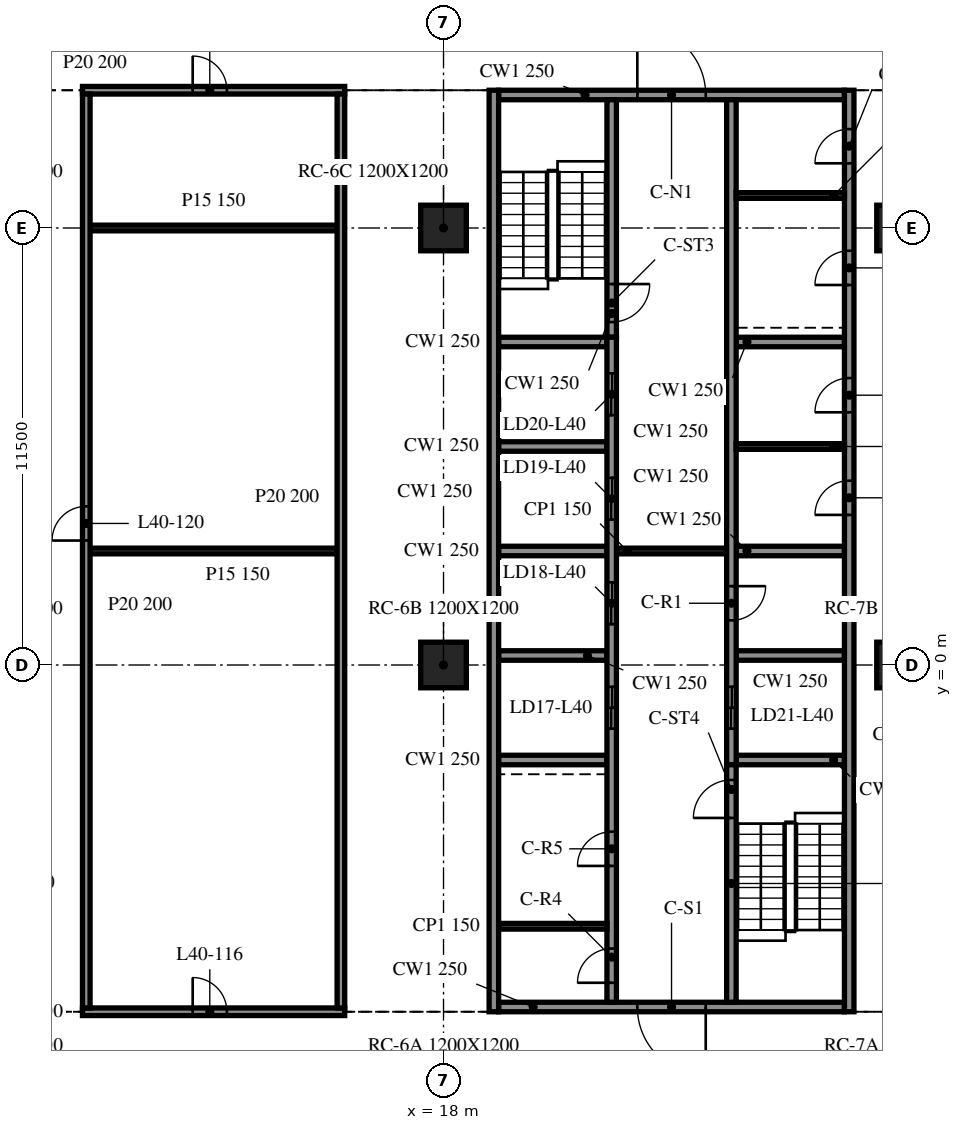
"""IFC4 building model, lengths in metres.
Left out: names, types, materials, properties, quantities, classifications, styles, units other than length and angle.
Written with IfcOpenShell. Run it as: python <this file> out.ifc"""

import sys

from ifc_helpers import new_model, si_unit, direction, frame, frame_2d, origin, origin_2d, place, context, subcontext, project, spatial, rectangle, extrude, element, fill, save


model = new_model("IFC4")
c1 = context("Model", 3, precision=1e-05, world=origin(), true_north=direction((0.0, 1.0)))
c2 = subcontext(c1, "Body", "Model", "MODEL_VIEW")
j1 = project(units=[si_unit("LENGTHUNIT", "METRE"), si_unit("PLANEANGLEUNIT", "RADIAN")], contexts=[c1])
p1 = place(None, origin())
s1 = spatial("IfcSite", under=j1, at=p1, CompositionType="ELEMENT")
p2 = place(p1, origin())
s2 = spatial("IfcBuilding", under=s1, at=p2, CompositionType="ELEMENT")
p3 = place(p2, frame((0.0, 0.0, 170.6)))
s3 = spatial("IfcBuildingStorey", under=s2, at=p3, CompositionType="ELEMENT", Elevation=170.6)
for number, where, z_axis, x_axis in (
    (1, (18.0, 0.0, -0.34), (0.0, 0.0, 1.0), (1.0, 0.0, 0.0)),
    (2, (18.0, 11.5, -0.34), (0.0, 0.0, 1.0), (1.0, 0.0, 0.0)),
    (3, (30.0, 0.0, -0.34), (0.0, 0.0, 1.0), (1.0, 0.0, 0.0)),
    (4, (30.0, 11.5, -0.34), (0.0, 0.0, 1.0), (1.0, 0.0, 0.0)),
):
    element("IfcColumn", number, at=place(p3, frame(where, z_axis=z_axis, x_axis=x_axis)), inside=s3, PredefinedType="COLUMN", context=c2, shape_type="SweptSolid", body=[
        extrude(rectangle(XDim=1.2, YDim=1.2, at=origin_2d()), origin(), (0.0, 0.0, 1.0), 3.8),
    ])
p4 = place(p3, frame((19.325, 15.125, 0.0), z_axis=(0.0, 0.0, 1.0), x_axis=(0.0, -1.0, 0.0)))
e5 = element("IfcWall", 5, at=p4, inside=s3, PredefinedType="SOLIDWALL", context=c2, shape_type="SweptSolid", body=[
    extrude(rectangle(XDim=24.25, YDim=0.25, at=frame_2d((12.125, 0.0))), origin(), (0.0, 0.0, 1.0), 3.46),
])
p5 = place(p3, frame((28.675, -9.125, 0.0), z_axis=(0.0, 0.0, 1.0), x_axis=(0.0, 1.0, 0.0)))
e6 = element("IfcWall", 6, at=p5, inside=s3, PredefinedType="SOLIDWALL", context=c2, shape_type="SweptSolid", body=[
    extrude(rectangle(XDim=24.25, YDim=0.25, at=frame_2d((12.125, 0.0))), origin(), (0.0, 0.0, 1.0), 3.46),
])
p6 = place(p5, frame((13.075, 0.0, 0.0)))
e7 = element("IfcOpeningElement", 7, at=p6, cuts=e6, PredefinedType="OPENING", context=c2, shape_type="SweptSolid", body=[
    extrude(rectangle(XDim=0.9, YDim=2.1, at=frame_2d((0.45, 1.05))), frame((0.0, 0.135, 0.0), z_axis=(0.0, -1.0, 0.0), x_axis=(1.0, 0.0, 0.0)), (0.0, 0.0, 1.0), 0.27),
])
p7 = place(p5, frame((15.775, 0.0, 0.0)))
e8 = element("IfcOpeningElement", 8, at=p7, cuts=e6, PredefinedType="OPENING", context=c2, shape_type="SweptSolid", body=[
    extrude(rectangle(XDim=0.9, YDim=2.1, at=frame_2d((0.45, 1.05))), frame((0.0, 0.135, 0.0), z_axis=(0.0, -1.0, 0.0), x_axis=(1.0, 0.0, 0.0)), (0.0, 0.0, 1.0), 0.27),
])
p8 = place(p5, frame((19.125, 0.0, 0.0)))
e9 = element("IfcOpeningElement", 9, at=p8, cuts=e6, PredefinedType="OPENING", context=c2, shape_type="SweptSolid", body=[
    extrude(rectangle(XDim=0.9, YDim=2.1, at=frame_2d((0.45, 1.05))), frame((0.0, 0.135, 0.0), z_axis=(0.0, -1.0, 0.0), x_axis=(1.0, 0.0, 0.0)), (0.0, 0.0, 1.0), 0.27),
])
p9 = place(p5, frame((22.327, 0.0, 0.0)))
e10 = element("IfcOpeningElement", 10, at=p9, cuts=e6, PredefinedType="OPENING", context=c2, shape_type="SweptSolid", body=[
    extrude(rectangle(XDim=0.9, YDim=2.1, at=frame_2d((0.45, 1.05))), frame((0.0, 0.135, 0.0), z_axis=(0.0, -1.0, 0.0), x_axis=(1.0, 0.0, 0.0)), (0.0, 0.0, 1.0), 0.27),
])
p10 = place(p3, frame((28.55, -9.0, 0.0), z_axis=(0.0, 0.0, 1.0), x_axis=(-1.0, 0.0, 0.0)))
e11 = element("IfcWall", 11, at=p10, inside=s3, PredefinedType="SOLIDWALL", context=c2, shape_type="SweptSolid", body=[
    extrude(rectangle(XDim=9.1, YDim=0.25, at=frame_2d((4.55, 0.0))), origin(), (0.0, 0.0, 1.0), 3.46),
])
p11 = place(p10, frame((3.65, 0.0, 0.0)))
e12 = element("IfcOpeningElement", 12, at=p11, cuts=e11, PredefinedType="OPENING", context=c2, shape_type="SweptSolid", body=[
    extrude(rectangle(XDim=1.8, YDim=2.1, at=frame_2d((0.9, 1.05))), frame((0.0, 0.135, 0.0), z_axis=(0.0, -1.0, 0.0), x_axis=(1.0, 0.0, 0.0)), (0.0, 0.0, 1.0), 0.27),
])
p12 = place(p3, frame((19.45, 15.0, 0.0), z_axis=(0.0, 0.0, 1.0), x_axis=(1.0, 0.0, 0.0)))
e13 = element("IfcWall", 13, at=p12, inside=s3, PredefinedType="SOLIDWALL", context=c2, shape_type="SweptSolid", body=[
    extrude(rectangle(XDim=9.1, YDim=0.25, at=frame_2d((4.55, 0.0))), origin(), (0.0, 0.0, 1.0), 3.46),
])
p13 = place(p12, frame((3.65, 0.0, 0.0)))
e14 = element("IfcOpeningElement", 14, at=p13, cuts=e13, PredefinedType="OPENING", context=c2, shape_type="SweptSolid", body=[
    extrude(rectangle(XDim=1.8, YDim=2.1, at=frame_2d((0.9, 1.05))), frame((0.0, 0.135, 0.0), z_axis=(0.0, -1.0, 0.0), x_axis=(1.0, 0.0, 0.0)), (0.0, 0.0, 1.0), 0.27),
])
p14 = place(p3, frame((22.425, -8.875, 0.0), z_axis=(0.0, 0.0, 1.0), x_axis=(0.0, 1.0, 0.0)))
e15 = element("IfcWall", 15, at=p14, inside=s3, PredefinedType="SOLIDWALL", context=c2, shape_type="SweptSolid", body=[
    extrude(rectangle(XDim=17.5, YDim=0.25, at=frame_2d((8.75, 0.0))), origin(), (0.0, 0.0, 1.0), 3.46),
])
p15 = place(p14, frame((7.2, 0.0, 0.0)))
e16 = element("IfcOpeningElement", 16, at=p15, cuts=e15, PredefinedType="OPENING", context=c2, shape_type="SweptSolid", body=[
    extrude(rectangle(XDim=1.1, YDim=2.1, at=frame_2d((0.55, 1.05))), frame((0.0, 0.135, 0.0), z_axis=(0.0, -1.0, 0.0), x_axis=(1.0, 0.0, 0.0)), (0.0, 0.0, 1.0), 0.27),
])
p16 = place(p14, frame((9.95, 0.0, 0.0)))
e17 = element("IfcOpeningElement", 17, at=p16, cuts=e15, PredefinedType="OPENING", context=c2, shape_type="SweptSolid", body=[
    extrude(rectangle(XDim=1.1, YDim=2.1, at=frame_2d((0.55, 1.05))), frame((0.0, 0.135, 0.0), z_axis=(0.0, -1.0, 0.0), x_axis=(1.0, 0.0, 0.0)), (0.0, 0.0, 1.0), 0.27),
])
p17 = place(p14, frame((12.7, 0.0, 0.0)))
e18 = element("IfcOpeningElement", 18, at=p17, cuts=e15, PredefinedType="OPENING", context=c2, shape_type="SweptSolid", body=[
    extrude(rectangle(XDim=1.1, YDim=2.1, at=frame_2d((0.55, 1.05))), frame((0.0, 0.135, 0.0), z_axis=(0.0, -1.0, 0.0), x_axis=(1.0, 0.0, 0.0)), (0.0, 0.0, 1.0), 0.27),
])
p18 = place(p14, frame((15.45, 0.0, 0.0)))
e19 = element("IfcOpeningElement", 19, at=p18, cuts=e15, PredefinedType="OPENING", context=c2, shape_type="SweptSolid", body=[
    extrude(rectangle(XDim=1.1, YDim=2.1, at=frame_2d((0.55, 1.05))), frame((0.0, 0.135, 0.0), z_axis=(0.0, -1.0, 0.0), x_axis=(1.0, 0.0, 0.0)), (0.0, 0.0, 1.0), 0.27),
])
p19 = place(p14, frame((0.512, 0.0, 0.0)))
e20 = element("IfcOpeningElement", 20, at=p19, cuts=e15, PredefinedType="OPENING", context=c2, shape_type="SweptSolid", body=[
    extrude(rectangle(XDim=0.9, YDim=2.1, at=frame_2d((0.45, 1.05))), frame((0.0, 0.135, 0.0), z_axis=(0.0, -1.0, 0.0), x_axis=(1.0, 0.0, 0.0)), (0.0, 0.0, 1.0), 0.27),
])
p20 = place(p14, frame((3.587, 0.0, 0.0)))
e21 = element("IfcOpeningElement", 21, at=p20, cuts=e15, PredefinedType="OPENING", context=c2, shape_type="SweptSolid", body=[
    extrude(rectangle(XDim=0.9, YDim=2.1, at=frame_2d((0.45, 1.05))), frame((0.0, 0.135, 0.0), z_axis=(0.0, -1.0, 0.0), x_axis=(1.0, 0.0, 0.0)), (0.0, 0.0, 1.0), 0.27),
])
p21 = place(p3, frame((22.425, 14.875, 0.0), z_axis=(0.0, 0.0, 1.0), x_axis=(0.0, -1.0, 0.0)))
e22 = element("IfcWall", 22, at=p21, inside=s3, PredefinedType="SOLIDWALL", context=c2, shape_type="SweptSolid", body=[
    extrude(rectangle(XDim=6.25, YDim=0.25, at=frame_2d((3.125, 0.0))), origin(), (0.0, 0.0, 1.0), 3.46),
])
p22 = place(p21, frame((4.85, 0.0, 0.0)))
e23 = element("IfcOpeningElement", 23, at=p22, cuts=e22, PredefinedType="OPENING", context=c2, shape_type="SweptSolid", body=[
    extrude(rectangle(XDim=1.0, YDim=2.1, at=frame_2d((0.5, 1.05))), frame((0.0, 0.135, 0.0), z_axis=(0.0, -1.0, 0.0), x_axis=(1.0, 0.0, 0.0)), (0.0, 0.0, 1.0), 0.27),
])
p23 = place(p3, frame((25.575, -8.875, 0.0), z_axis=(0.0, 0.0, 1.0), x_axis=(0.0, 1.0, 0.0)))
e24 = element("IfcWall", 24, at=p23, inside=s3, PredefinedType="SOLIDWALL", context=c2, shape_type="SweptSolid", body=[
    extrude(rectangle(XDim=6.25, YDim=0.25, at=frame_2d((3.125, 0.0))), origin(), (0.0, 0.0, 1.0), 3.46),
])
p24 = place(p23, frame((4.85, 0.0, 0.0)))
e25 = element("IfcOpeningElement", 25, at=p24, cuts=e24, PredefinedType="OPENING", context=c2, shape_type="SweptSolid", body=[
    extrude(rectangle(XDim=1.0, YDim=2.1, at=frame_2d((0.5, 1.05))), frame((0.0, 0.135, 0.0), z_axis=(0.0, -1.0, 0.0), x_axis=(1.0, 0.0, 0.0)), (0.0, 0.0, 1.0), 0.27),
])
p25 = place(p3, frame((25.575, 14.875, 0.0), z_axis=(0.0, 0.0, 1.0), x_axis=(0.0, -1.0, 0.0)))
e26 = element("IfcWall", 26, at=p25, inside=s3, PredefinedType="SOLIDWALL", context=c2, shape_type="SweptSolid", body=[
    extrude(rectangle(XDim=17.5, YDim=0.25, at=frame_2d((8.75, 0.0))), origin(), (0.0, 0.0, 1.0), 3.46),
])
p26 = place(p25, frame((15.45, 0.0, 0.0)))
e27 = element("IfcOpeningElement", 27, at=p26, cuts=e26, PredefinedType="OPENING", context=c2, shape_type="SweptSolid", body=[
    extrude(rectangle(XDim=1.1, YDim=2.1, at=frame_2d((0.55, 1.05))), frame((0.0, 0.135, 0.0), z_axis=(0.0, -1.0, 0.0), x_axis=(1.0, 0.0, 0.0)), (0.0, 0.0, 1.0), 0.27),
])
p27 = place(p25, frame((12.8, 0.0, 0.0)))
e28 = element("IfcOpeningElement", 28, at=p27, cuts=e26, PredefinedType="OPENING", context=c2, shape_type="SweptSolid", body=[
    extrude(rectangle(XDim=0.9, YDim=2.1, at=frame_2d((0.45, 1.05))), frame((0.0, 0.135, 0.0), z_axis=(0.0, -1.0, 0.0), x_axis=(1.0, 0.0, 0.0)), (0.0, 0.0, 1.0), 0.27),
])
for number, where, z_axis, x_axis in (
    (29, (19.45, -2.5, 0.0), (0.0, 0.0, 1.0), (1.0, 0.0, 0.0)),
    (30, (19.45, 0.25, 0.0), (0.0, 0.0, 1.0), (1.0, 0.0, 0.0)),
    (31, (19.45, 3.0, 0.0), (0.0, 0.0, 1.0), (1.0, 0.0, 0.0)),
    (32, (19.45, 5.75, 0.0), (0.0, 0.0, 1.0), (1.0, 0.0, 0.0)),
    (33, (19.45, 8.5, 0.0), (0.0, 0.0, 1.0), (1.0, 0.0, 0.0)),
    (34, (25.7, -2.5, 0.0), (0.0, 0.0, 1.0), (1.0, 0.0, 0.0)),
    (35, (25.7, 0.25, 0.0), (0.0, 0.0, 1.0), (1.0, 0.0, 0.0)),
    (36, (25.7, 3.0, 0.0), (0.0, 0.0, 1.0), (1.0, 0.0, 0.0)),
    (37, (25.7, 8.5, 0.0), (0.0, 0.0, 1.0), (1.0, 0.0, 0.0)),
):
    element("IfcWall", number, at=place(p3, frame(where, z_axis=z_axis, x_axis=x_axis)), inside=s3, PredefinedType="SOLIDWALL", context=c2, shape_type="SweptSolid", body=[
        extrude(rectangle(XDim=2.85, YDim=0.25, at=frame_2d((1.425, 0.0))), origin(), (0.0, 0.0, 1.0), 3.46),
    ])
p28 = place(p3, frame((22.55, 3.0, 0.0), z_axis=(0.0, 0.0, 1.0), x_axis=(1.0, 0.0, 0.0)))
e38 = element("IfcWall", 38, at=p28, inside=s3, PredefinedType="PARTITIONING", context=c2, shape_type="SweptSolid", body=[
    extrude(rectangle(XDim=2.9, YDim=0.15, at=frame_2d((1.45, 0.0))), origin(), (0.0, 0.0, 1.0), 3.46),
])
for number, where, z_axis, x_axis in (
    (39, (25.7, 5.75, 0.0), (0.0, 0.0, 1.0), (1.0, 0.0, 0.0)),
    (40, (19.45, -6.875, 0.0), (0.0, 0.0, 1.0), (1.0, 0.0, 0.0)),
    (41, (25.7, 12.355, 0.0), (0.0, 0.0, 1.0), (1.0, 0.0, 0.0)),
):
    element("IfcWall", number, at=place(p3, frame(where, z_axis=z_axis, x_axis=x_axis)), inside=s3, PredefinedType="PARTITIONING", context=c2, shape_type="SweptSolid", body=[
        extrude(rectangle(XDim=2.85, YDim=0.15, at=frame_2d((1.425, 0.0))), origin(), (0.0, 0.0, 1.0), 3.46),
    ])
p29 = place(p3, frame((8.5, -9.125, 0.0), z_axis=(0.0, 0.0, 1.0), x_axis=(1.0, 0.0, 0.0)))
e42 = element("IfcWall", 42, at=p29, inside=s3, PredefinedType="PARTITIONING", context=c2, shape_type="SweptSolid", body=[
    extrude(rectangle(XDim=6.9, YDim=0.2, at=frame_2d((3.45, 0.0))), origin(), (0.0, 0.0, 1.0), 3.46),
])
p30 = place(p29, frame((2.9, 0.0, 0.0)))
e43 = element("IfcOpeningElement", 43, at=p30, cuts=e42, PredefinedType="OPENING", context=c2, shape_type="SweptSolid", body=[
    extrude(rectangle(XDim=0.9, YDim=2.1, at=frame_2d((0.45, 1.05))), frame((0.0, 0.11, 0.0), z_axis=(0.0, -1.0, 0.0), x_axis=(1.0, 0.0, 0.0)), (0.0, 0.0, 1.0), 0.22),
])
for number, where, z_axis, x_axis in (
    (44, (8.7, 3.0, 0.0), (0.0, 0.0, 1.0), (1.0, 0.0, 0.0)),
    (45, (8.7, 11.5, 0.0), (0.0, 0.0, 1.0), (1.0, 0.0, 0.0)),
):
    element("IfcWall", number, at=place(p3, frame(where, z_axis=z_axis, x_axis=x_axis)), inside=s3, PredefinedType="PARTITIONING", context=c2, shape_type="SweptSolid", body=[
        extrude(rectangle(XDim=6.5, YDim=0.15, at=frame_2d((3.25, 0.0))), origin(), (0.0, 0.0, 1.0), 3.46),
    ])
p31 = place(p3, frame((8.5, 15.125, 0.0), z_axis=(0.0, 0.0, 1.0), x_axis=(1.0, 0.0, 0.0)))
e46 = element("IfcWall", 46, at=p31, inside=s3, PredefinedType="PARTITIONING", context=c2, shape_type="SweptSolid", body=[
    extrude(rectangle(XDim=6.9, YDim=0.2, at=frame_2d((3.45, 0.0))), origin(), (0.0, 0.0, 1.0), 3.46),
])
p32 = place(p31, frame((2.9, 0.0, 0.0)))
e47 = element("IfcOpeningElement", 47, at=p32, cuts=e46, PredefinedType="OPENING", context=c2, shape_type="SweptSolid", body=[
    extrude(rectangle(XDim=0.9, YDim=2.1, at=frame_2d((0.45, 1.05))), frame((0.0, 0.11, 0.0), z_axis=(0.0, -1.0, 0.0), x_axis=(1.0, 0.0, 0.0)), (0.0, 0.0, 1.0), 0.22),
])
p33 = place(p3, frame((8.6, -9.025, 0.0), z_axis=(0.0, 0.0, 1.0), x_axis=(0.0, 1.0, 0.0)))
e48 = element("IfcWall", 48, at=p33, inside=s3, PredefinedType="PARTITIONING", context=c2, shape_type="SweptSolid", body=[
    extrude(rectangle(XDim=24.05, YDim=0.2, at=frame_2d((12.025, 0.0))), origin(), (0.0, 0.0, 1.0), 3.46),
])
p34 = place(p33, frame((12.3, 0.0, 0.0)))
e49 = element("IfcOpeningElement", 49, at=p34, cuts=e48, PredefinedType="OPENING", context=c2, shape_type="SweptSolid", body=[
    extrude(rectangle(XDim=0.9, YDim=2.1, at=frame_2d((0.45, 1.05))), frame((0.0, 0.11, 0.0), z_axis=(0.0, -1.0, 0.0), x_axis=(1.0, 0.0, 0.0)), (0.0, 0.0, 1.0), 0.22),
])
p35 = place(p3, frame((15.3, -9.025, 0.0), z_axis=(0.0, 0.0, 1.0), x_axis=(0.0, 1.0, 0.0)))
e50 = element("IfcWall", 50, at=p35, inside=s3, PredefinedType="PARTITIONING", context=c2, shape_type="SweptSolid", body=[
    extrude(rectangle(XDim=24.05, YDim=0.2, at=frame_2d((12.025, 0.0))), origin(), (0.0, 0.0, 1.0), 3.46),
])
p36 = place(p11, origin())
e51 = element("IfcDoor", 51, at=p36, inside=s3, OperationType="DOUBLE_DOOR_SINGLE_SWING", PredefinedType="DOOR", context=c2, shape_type="SweptSolid", body=[
    extrude(rectangle(XDim=1.8, YDim=2.1, at=frame_2d((0.9, 1.05))), frame((0.0, 0.025, 0.0), z_axis=(0.0, -1.0, 0.0), x_axis=(1.0, 0.0, 0.0)), (0.0, 0.0, 1.0), 0.05),
])
fill(e12, e51)
p37 = place(p13, origin())
e52 = element("IfcDoor", 52, at=p37, inside=s3, OperationType="DOUBLE_DOOR_SINGLE_SWING", PredefinedType="DOOR", context=c2, shape_type="SweptSolid", body=[
    extrude(rectangle(XDim=1.8, YDim=2.1, at=frame_2d((0.9, 1.05))), frame((0.0, 0.025, 0.0), z_axis=(0.0, -1.0, 0.0), x_axis=(1.0, 0.0, 0.0)), (0.0, 0.0, 1.0), 0.05),
])
fill(e14, e52)
p38 = place(p26, origin())
e53 = element("IfcDoor", 53, at=p38, inside=s3, OperationType="DOUBLE_DOOR_SLIDING", PredefinedType="DOOR", context=c2, shape_type="SweptSolid", body=[
    extrude(rectangle(XDim=1.1, YDim=2.1, at=frame_2d((0.55, 1.05))), frame((0.0, 0.025, 0.0), z_axis=(0.0, -1.0, 0.0), x_axis=(1.0, 0.0, 0.0)), (0.0, 0.0, 1.0), 0.05),
])
fill(e27, e53)
p39 = place(p15, origin())
e54 = element("IfcDoor", 54, at=p39, inside=s3, OperationType="DOUBLE_DOOR_SLIDING", PredefinedType="DOOR", context=c2, shape_type="SweptSolid", body=[
    extrude(rectangle(XDim=1.1, YDim=2.1, at=frame_2d((0.55, 1.05))), frame((0.0, 0.025, 0.0), z_axis=(0.0, -1.0, 0.0), x_axis=(1.0, 0.0, 0.0)), (0.0, 0.0, 1.0), 0.05),
])
fill(e16, e54)
p40 = place(p16, origin())
e55 = element("IfcDoor", 55, at=p40, inside=s3, OperationType="DOUBLE_DOOR_SLIDING", PredefinedType="DOOR", context=c2, shape_type="SweptSolid", body=[
    extrude(rectangle(XDim=1.1, YDim=2.1, at=frame_2d((0.55, 1.05))), frame((0.0, 0.025, 0.0), z_axis=(0.0, -1.0, 0.0), x_axis=(1.0, 0.0, 0.0)), (0.0, 0.0, 1.0), 0.05),
])
fill(e17, e55)
p41 = place(p17, origin())
e56 = element("IfcDoor", 56, at=p41, inside=s3, OperationType="DOUBLE_DOOR_SLIDING", PredefinedType="DOOR", context=c2, shape_type="SweptSolid", body=[
    extrude(rectangle(XDim=1.1, YDim=2.1, at=frame_2d((0.55, 1.05))), frame((0.0, 0.025, 0.0), z_axis=(0.0, -1.0, 0.0), x_axis=(1.0, 0.0, 0.0)), (0.0, 0.0, 1.0), 0.05),
])
fill(e18, e56)
p42 = place(p18, origin())
e57 = element("IfcDoor", 57, at=p42, inside=s3, OperationType="DOUBLE_DOOR_SLIDING", PredefinedType="DOOR", context=c2, shape_type="SweptSolid", body=[
    extrude(rectangle(XDim=1.1, YDim=2.1, at=frame_2d((0.55, 1.05))), frame((0.0, 0.025, 0.0), z_axis=(0.0, -1.0, 0.0), x_axis=(1.0, 0.0, 0.0)), (0.0, 0.0, 1.0), 0.05),
])
fill(e19, e57)
p43 = place(p27, origin())
e58 = element("IfcDoor", 58, at=p43, inside=s3, OperationType="SINGLE_SWING_LEFT", PredefinedType="DOOR", context=c2, shape_type="SweptSolid", body=[
    extrude(rectangle(XDim=0.9, YDim=2.1, at=frame_2d((0.45, 1.05))), frame((0.0, 0.025, 0.0), z_axis=(0.0, -1.0, 0.0), x_axis=(1.0, 0.0, 0.0)), (0.0, 0.0, 1.0), 0.05),
])
fill(e28, e58)
p44 = place(p6, origin())
e59 = element("IfcDoor", 59, at=p44, inside=s3, OperationType="SINGLE_SWING_RIGHT", PredefinedType="DOOR", context=c2, shape_type="SweptSolid", body=[
    extrude(rectangle(XDim=0.9, YDim=2.1, at=frame_2d((0.45, 1.05))), frame((0.0, 0.025, 0.0), z_axis=(0.0, -1.0, 0.0), x_axis=(1.0, 0.0, 0.0)), (0.0, 0.0, 1.0), 0.05),
])
fill(e7, e59)
p45 = place(p7, origin())
e60 = element("IfcDoor", 60, at=p45, inside=s3, OperationType="SINGLE_SWING_LEFT", PredefinedType="DOOR", context=c2, shape_type="SweptSolid", body=[
    extrude(rectangle(XDim=0.9, YDim=2.1, at=frame_2d((0.45, 1.05))), frame((0.0, 0.025, 0.0), z_axis=(0.0, -1.0, 0.0), x_axis=(1.0, 0.0, 0.0)), (0.0, 0.0, 1.0), 0.05),
])
fill(e8, e60)
p46 = place(p19, origin())
e61 = element("IfcDoor", 61, at=p46, inside=s3, OperationType="SINGLE_SWING_RIGHT", PredefinedType="DOOR", context=c2, shape_type="SweptSolid", body=[
    extrude(rectangle(XDim=0.9, YDim=2.1, at=frame_2d((0.45, 1.05))), frame((0.0, 0.025, 0.0), z_axis=(0.0, -1.0, 0.0), x_axis=(1.0, 0.0, 0.0)), (0.0, 0.0, 1.0), 0.05),
])
fill(e20, e61)
p47 = place(p20, origin())
e62 = element("IfcDoor", 62, at=p47, inside=s3, OperationType="SINGLE_SWING_LEFT", PredefinedType="DOOR", context=c2, shape_type="SweptSolid", body=[
    extrude(rectangle(XDim=0.9, YDim=2.1, at=frame_2d((0.45, 1.05))), frame((0.0, 0.025, 0.0), z_axis=(0.0, -1.0, 0.0), x_axis=(1.0, 0.0, 0.0)), (0.0, 0.0, 1.0), 0.05),
])
fill(e21, e62)
p48 = place(p8, origin())
e63 = element("IfcDoor", 63, at=p48, inside=s3, OperationType="SINGLE_SWING_RIGHT", PredefinedType="DOOR", context=c2, shape_type="SweptSolid", body=[
    extrude(rectangle(XDim=0.9, YDim=2.1, at=frame_2d((0.45, 1.05))), frame((0.0, 0.025, 0.0), z_axis=(0.0, -1.0, 0.0), x_axis=(1.0, 0.0, 0.0)), (0.0, 0.0, 1.0), 0.05),
])
fill(e9, e63)
p49 = place(p9, origin())
e64 = element("IfcDoor", 64, at=p49, inside=s3, OperationType="SINGLE_SWING_LEFT", PredefinedType="DOOR", context=c2, shape_type="SweptSolid", body=[
    extrude(rectangle(XDim=0.9, YDim=2.1, at=frame_2d((0.45, 1.05))), frame((0.0, 0.025, 0.0), z_axis=(0.0, -1.0, 0.0), x_axis=(1.0, 0.0, 0.0)), (0.0, 0.0, 1.0), 0.05),
])
fill(e10, e64)
p50 = place(p22, origin())
e65 = element("IfcDoor", 65, at=p50, inside=s3, OperationType="SINGLE_SWING_RIGHT", PredefinedType="DOOR", context=c2, shape_type="SweptSolid", body=[
    extrude(rectangle(XDim=1.0, YDim=2.1, at=frame_2d((0.5, 1.05))), frame((0.0, 0.025, 0.0), z_axis=(0.0, -1.0, 0.0), x_axis=(1.0, 0.0, 0.0)), (0.0, 0.0, 1.0), 0.05),
])
fill(e23, e65)
p51 = place(p24, origin())
e66 = element("IfcDoor", 66, at=p51, inside=s3, OperationType="SINGLE_SWING_LEFT", PredefinedType="DOOR", context=c2, shape_type="SweptSolid", body=[
    extrude(rectangle(XDim=1.0, YDim=2.1, at=frame_2d((0.5, 1.05))), frame((0.0, 0.025, 0.0), z_axis=(0.0, -1.0, 0.0), x_axis=(1.0, 0.0, 0.0)), (0.0, 0.0, 1.0), 0.05),
])
fill(e25, e66)
p52 = place(p30, origin())
e67 = element("IfcDoor", 67, at=p52, inside=s3, OperationType="SINGLE_SWING_LEFT", PredefinedType="DOOR", context=c2, shape_type="SweptSolid", body=[
    extrude(rectangle(XDim=0.9, YDim=2.1, at=frame_2d((0.45, 1.05))), frame((0.0, 0.025, 0.0), z_axis=(0.0, -1.0, 0.0), x_axis=(1.0, 0.0, 0.0)), (0.0, 0.0, 1.0), 0.05),
])
fill(e43, e67)
p53 = place(p34, origin())
e68 = element("IfcDoor", 68, at=p53, inside=s3, OperationType="SINGLE_SWING_LEFT", PredefinedType="DOOR", context=c2, shape_type="SweptSolid", body=[
    extrude(rectangle(XDim=0.9, YDim=2.1, at=frame_2d((0.45, 1.05))), frame((0.0, 0.025, 0.0), z_axis=(0.0, -1.0, 0.0), x_axis=(1.0, 0.0, 0.0)), (0.0, 0.0, 1.0), 0.05),
])
fill(e49, e68)
p54 = place(p32, origin())
e69 = element("IfcDoor", 69, at=p54, inside=s3, OperationType="SINGLE_SWING_RIGHT", PredefinedType="DOOR", context=c2, shape_type="SweptSolid", body=[
    extrude(rectangle(XDim=0.9, YDim=2.1, at=frame_2d((0.45, 1.05))), frame((0.0, 0.025, 0.0), z_axis=(0.0, -1.0, 0.0), x_axis=(1.0, 0.0, 0.0)), (0.0, 0.0, 1.0), 0.05),
])
fill(e47, e69)
save(model, sys.argv[1])
